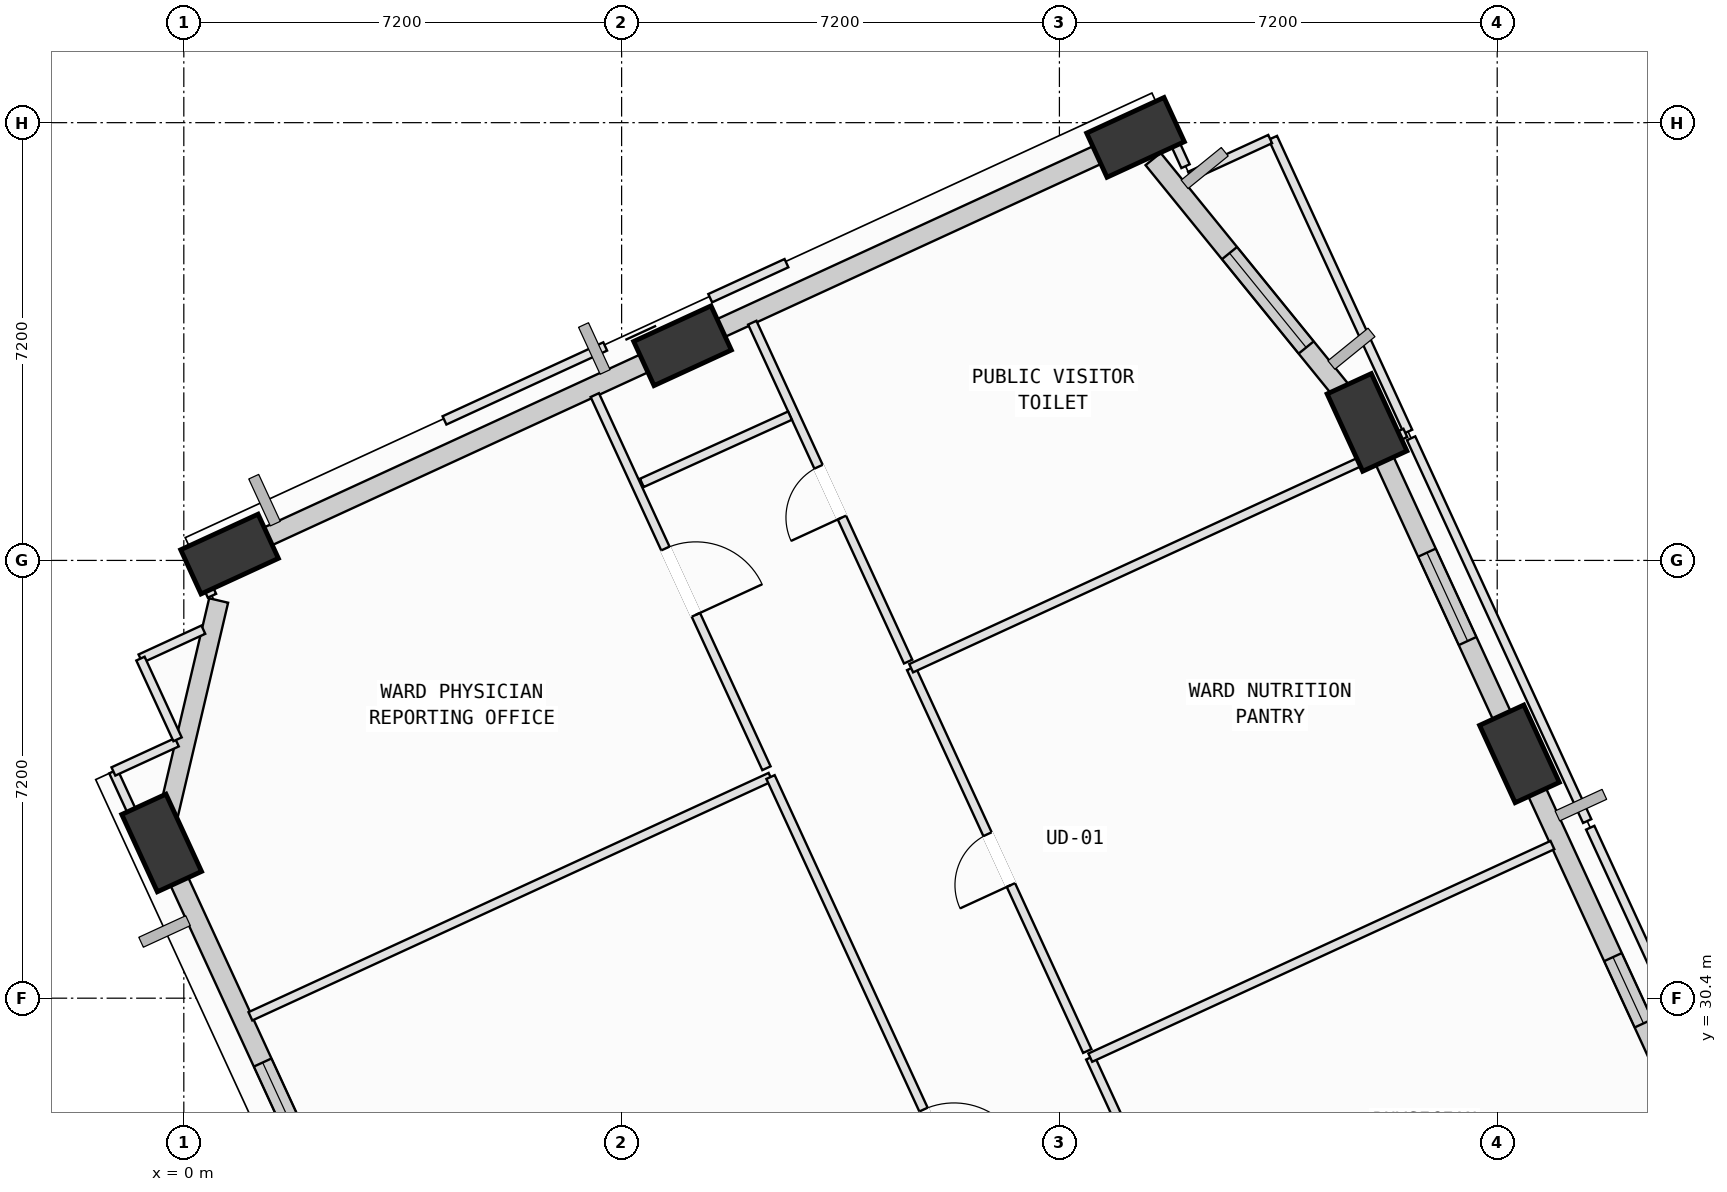
"""IFC4 building model, lengths in metres.
Left out: names, types, materials, properties, quantities, classifications, styles, units other than length and angle.
Written with IfcOpenShell. Run it as: python <this file> out.ifc"""

import sys

from ifc_helpers import new_model, si_unit, direction, frame, frame_2d, origin, origin_2d, place, context, subcontext, project, spatial, rectangle, extrude, element, fill, save


model = new_model("IFC4")
c1 = context("Model", 3, precision=1e-05, world=origin(), true_north=direction((0.0, 1.0)))
c2 = subcontext(c1, "Body", "Model", "MODEL_VIEW")
j1 = project(units=[si_unit("LENGTHUNIT", "METRE"), si_unit("PLANEANGLEUNIT", "RADIAN")], contexts=[c1])
p1 = place(None, origin())
s1 = spatial("IfcSite", under=j1, at=p1, CompositionType="ELEMENT")
p2 = place(p1, origin())
s2 = spatial("IfcBuilding", under=s1, at=p2, CompositionType="ELEMENT")
p3 = place(p2, frame((0.0, 0.0, 128.4)))
s3 = spatial("IfcBuildingStorey", under=s2, at=p3, CompositionType="ELEMENT", Elevation=128.4)
p4 = place(p3, frame((21.966, 34.419, 0.002), z_axis=(-0.039387790882, -0.048472590946, 0.998047598993), x_axis=(0.247513343788, 0.9672214419, 0.056743519237)))
e1 = element("IfcColumn", 1, at=p4, inside=s3, PredefinedType="COLUMN", context=c2, shape_type="SweptSolid", body=[
    extrude(rectangle(XDim=1.4, YDim=0.8, at=origin_2d()), origin(), (0.0, 0.0, 1.0), 4.004),
])
p5 = place(p3, frame((19.459, 39.87, 0.002), z_axis=(-0.061781069233, -0.058920270954, 0.996349085991), x_axis=(0.366661036491, 0.927115878049, 0.077561801087)))
e2 = element("IfcColumn", 2, at=p5, inside=s3, PredefinedType="COLUMN", context=c2, shape_type="SweptSolid", body=[
    extrude(rectangle(XDim=1.4, YDim=0.8, at=origin_2d()), origin(), (0.0, 0.0, 1.0), 4.011),
])
p6 = place(p3, frame((15.652, 44.558, 0.002), z_axis=(-0.080758451197, -0.074625666557, 0.993936156124), x_axis=(0.921615897626, -0.385373724027, 0.04594812371)))
e3 = element("IfcColumn", 3, at=p6, inside=s3, PredefinedType="COLUMN", context=c2, shape_type="SweptSolid", body=[
    extrude(rectangle(XDim=1.4, YDim=0.8, at=origin_2d()), origin(), (0.0, 0.0, 1.0), 4.021),
])
p7 = place(p3, frame((8.202, 41.131, 0.002), z_axis=(-0.066315906704, -0.105050700474, 0.992253269507), x_axis=(0.989572277027, -0.134357096422, 0.05191222573)))
e4 = element("IfcColumn", 4, at=p7, inside=s3, PredefinedType="COLUMN", context=c2, shape_type="SweptSolid", body=[
    extrude(rectangle(XDim=1.4, YDim=0.8, at=origin_2d()), origin(), (0.0, 0.0, 1.0), 4.028),
])
p8 = place(p3, frame((0.752, 37.704, 0.002), z_axis=(-0.051803682793, -0.135161067357, 0.989468475657), x_axis=(0.996307293589, 0.060936555127, 0.060485642854)))
e5 = element("IfcColumn", 5, at=p8, inside=s3, PredefinedType="COLUMN", context=c2, shape_type="SweptSolid", body=[
    extrude(rectangle(XDim=1.4, YDim=0.8, at=origin_2d()), origin(), (0.0, 0.0, 1.0), 4.039),
])
p9 = place(p3, frame((-0.365, 32.953, 0.002), z_axis=(-0.032286006217, -0.139603723512, 0.989680965859), x_axis=(-0.20452711643, 0.970166043723, 0.130178747314)))
e6 = element("IfcColumn", 6, at=p9, inside=s3, PredefinedType="COLUMN", context=c2, shape_type="SweptSolid", body=[
    extrude(rectangle(XDim=1.4, YDim=0.8, at=origin_2d()), origin(), (0.0, 0.0, 1.0), 4.038),
])
p10 = place(p3, frame((22.191, 33.929, 0.0), z_axis=(0.0, 0.0, 1.0), x_axis=(0.417833720383, -0.908523517643, 0.0)))
e7 = element("IfcWall", 7, at=p10, inside=s3, PredefinedType="SOLIDWALL", context=c2, shape_type="SweptSolid", body=[
    extrude(rectangle(XDim=6.223, YDim=0.32, at=frame_2d((3.111, 0.0))), origin(), (0.0, 0.0, 1.0), 3.165),
])
p11 = place(p10, frame((3.141, 0.0, 0.75)))
e8 = element("IfcOpeningElement", 8, at=p11, cuts=e7, PredefinedType="OPENING", context=c2, shape_type="SweptSolid", body=[
    extrude(rectangle(XDim=1.2, YDim=1.75, at=frame_2d((0.6, 0.875))), frame((0.0, 0.17, 0.0), z_axis=(0.0, -1.0, 0.0), x_axis=(1.0, 0.0, 0.0)), (0.0, 0.0, 1.0), 0.34),
])
p12 = place(p3, frame((19.678, 39.393, 0.0), z_axis=(0.0, 0.0, 1.0), x_axis=(0.417876863303, -0.908503674795, 0.0)))
e9 = element("IfcWall", 9, at=p12, inside=s3, PredefinedType="SOLIDWALL", context=c2, shape_type="SweptSolid", body=[
    extrude(rectangle(XDim=5.047, YDim=0.32, at=frame_2d((2.524, 0.0))), origin(), (0.0, 0.0, 1.0), 3.165),
])
p13 = place(p12, frame((1.833, 0.0, 0.75)))
e10 = element("IfcOpeningElement", 10, at=p13, cuts=e9, PredefinedType="OPENING", context=c2, shape_type="SweptSolid", body=[
    extrude(rectangle(XDim=1.6, YDim=1.95, at=frame_2d((0.8, 0.975))), frame((0.0, 0.17, 0.0), z_axis=(0.0, -1.0, 0.0), x_axis=(1.0, 0.0, 0.0)), (0.0, 0.0, 1.0), 0.34),
])
p14 = place(p3, frame((15.941, 44.202, 0.0), z_axis=(0.0, 0.0, 1.0), x_axis=(0.63040801919, -0.776263955972, 0.0)))
e11 = element("IfcWall", 11, at=p14, inside=s3, PredefinedType="SOLIDWALL", context=c2, shape_type="SweptSolid", body=[
    extrude(rectangle(XDim=5.129, YDim=0.32, at=frame_2d((2.564, 0.0))), origin(), (0.0, 0.0, 1.0), 3.165),
])
p15 = place(p14, frame((1.993, 0.0, 0.75)))
e12 = element("IfcOpeningElement", 12, at=p15, cuts=e11, PredefinedType="OPENING", context=c2, shape_type="SweptSolid", body=[
    extrude(rectangle(XDim=2.0, YDim=1.95, at=frame_2d((1.0, 0.975))), frame((0.0, 0.17, 0.0), z_axis=(0.0, -1.0, 0.0), x_axis=(1.0, 0.0, 0.0)), (0.0, 0.0, 1.0), 0.34),
])
p16 = place(p3, frame((8.445, 41.243, 0.0), z_axis=(0.0, 0.0, 1.0), x_axis=(0.908511987078, 0.417858791143, 0.0)))
e13 = element("IfcWall", 13, at=p16, inside=s3, PredefinedType="SOLIDWALL", context=c2, shape_type="SweptSolid", body=[
    extrude(rectangle(XDim=7.231, YDim=0.32, at=frame_2d((3.615, 0.0))), origin(), (0.0, 0.0, 1.0), 3.165),
])
p17 = place(p3, frame((0.973, 37.806, 0.0), z_axis=(0.0, 0.0, 1.0), x_axis=(0.908513910625, 0.417854608927, 0.0)))
e14 = element("IfcWall", 14, at=p17, inside=s3, PredefinedType="SOLIDWALL", context=c2, shape_type="SweptSolid", body=[
    extrude(rectangle(XDim=7.27, YDim=0.32, at=frame_2d((3.635, 0.0))), origin(), (0.0, 0.0, 1.0), 3.165),
])
p18 = place(p3, frame((-0.317, 33.155, 0.0), z_axis=(0.0, 0.0, 1.0), x_axis=(0.228790927923, 0.97347558331, 0.0)))
e15 = element("IfcWall", 15, at=p18, inside=s3, PredefinedType="SOLIDWALL", context=c2, shape_type="SweptSolid", body=[
    extrude(rectangle(XDim=3.89, YDim=0.32, at=frame_2d((1.945, 0.0))), origin(), (0.0, 0.0, 1.0), 3.165),
])
p19 = place(p3, frame((2.205, 27.368, 0.0), z_axis=(0.0, 0.0, 1.0), x_axis=(-0.417871628393, 0.908506082635, 0.0)))
e16 = element("IfcWall", 16, at=p19, inside=s3, PredefinedType="SOLIDWALL", context=c2, shape_type="SweptSolid", body=[
    extrude(rectangle(XDim=5.456, YDim=0.32, at=frame_2d((2.728, 0.0))), origin(), (0.0, 0.0, 1.0), 3.165),
])
p20 = place(p19, frame((0.573, 0.0, 0.75)))
e17 = element("IfcOpeningElement", 17, at=p20, cuts=e16, PredefinedType="OPENING", context=c2, shape_type="SweptSolid", body=[
    extrude(rectangle(XDim=1.6, YDim=1.95, at=frame_2d((0.8, 0.975))), frame((0.0, 0.17, 0.0), z_axis=(0.0, -1.0, 0.0), x_axis=(1.0, 0.0, 0.0)), (0.0, 0.0, 1.0), 0.34),
])
p21 = place(p3, frame((1.095, 30.102, 0.0), z_axis=(0.0, 0.0, 1.0), x_axis=(0.908480804965, 0.417926580884, 0.0)))
e18 = element("IfcWall", 18, at=p21, inside=s3, PredefinedType="PARTITIONING", context=c2, shape_type="SweptSolid", body=[
    extrude(rectangle(XDim=9.416, YDim=0.15, at=frame_2d((4.708, 0.0))), origin(), (0.0, 0.0, 1.0), 3.78),
])
p22 = place(p3, frame((9.649, 34.037, 0.0), z_axis=(0.0, 0.0, 1.0), x_axis=(0.417880345161, -0.908502073266, 0.0)))
e19 = element("IfcWall", 19, at=p22, inside=s3, PredefinedType="PARTITIONING", context=c2, shape_type="SweptSolid", body=[
    extrude(rectangle(XDim=13.24, YDim=0.15, at=frame_2d((6.62, 0.0))), origin(), (0.0, 0.0, 1.0), 2.965),
])
p23 = place(p22, frame((6.02, 0.0, 0.0)))
e20 = element("IfcOpeningElement", 20, at=p23, cuts=e19, PredefinedType="OPENING", context=c2, shape_type="SweptSolid", body=[
    extrude(rectangle(XDim=1.2, YDim=2.15, at=frame_2d((0.6, 1.075))), frame((0.0, 0.085, 0.0), z_axis=(0.0, -1.0, 0.0), x_axis=(1.0, 0.0, 0.0)), (0.0, 0.0, 1.0), 0.17),
])
p24 = place(p3, frame((-0.713, 35.985, 0.0), z_axis=(0.0, 0.0, 1.0), x_axis=(0.908417143936, 0.41806493826, 0.0)))
e21 = element("IfcWall", 21, at=p24, inside=s3, PredefinedType="PARTITIONING", context=c2, shape_type="SweptSolid", body=[
    extrude(rectangle(XDim=1.138, YDim=0.15, at=frame_2d((0.569, 0.0))), origin(), (0.0, 0.0, 1.0), 3.78),
])
p25 = place(p3, frame((0.463, 37.019, 0.0), z_axis=(0.0, 0.0, 1.0), x_axis=(-0.418481684179, 0.908225236385, 0.0)))
e22 = element("IfcWall", 22, at=p25, inside=s3, PredefinedType="PARTITIONING", context=c2, shape_type="SweptSolid", body=[
    extrude(rectangle(XDim=0.671, YDim=0.15, at=frame_2d((0.336, 0.0))), origin(), (0.0, 0.0, 1.0), 2.965),
])
p26 = place(p3, frame((0.182, 37.629, 0.0), z_axis=(0.0, 0.0, 1.0), x_axis=(0.908607354341, 0.417651380504, 0.0)))
e23 = element("IfcWall", 23, at=p26, inside=s3, PredefinedType="PARTITIONING", context=c2, shape_type="SweptSolid", body=[
    extrude(rectangle(XDim=0.793, YDim=0.15, at=frame_2d((0.396, 0.0))), origin(), (0.0, 0.0, 1.0), 3.78),
])
p27 = place(p3, frame((6.759, 40.319, 0.0), z_axis=(0.0, 0.0, 1.0), x_axis=(0.417891290431, -0.908497038731, 0.0)))
e24 = element("IfcWall", 24, at=p27, inside=s3, PredefinedType="PARTITIONING", context=c2, shape_type="SweptSolid", body=[
    extrude(rectangle(XDim=6.755, YDim=0.15, at=frame_2d((3.378, 0.0))), origin(), (0.0, 0.0, 1.0), 2.965),
])
p28 = place(p27, frame((2.778, 0.0, 0.0)))
e25 = element("IfcOpeningElement", 25, at=p28, cuts=e24, PredefinedType="OPENING", context=c2, shape_type="SweptSolid", body=[
    extrude(rectangle(XDim=1.2, YDim=2.15, at=frame_2d((0.6, 1.075))), frame((0.0, 0.085, 0.0), z_axis=(0.0, -1.0, 0.0), x_axis=(1.0, 0.0, 0.0)), (0.0, 0.0, 1.0), 0.17),
])
p29 = place(p3, frame((-0.284, 32.228, 0.0), z_axis=(0.0, 0.0, 1.0), x_axis=(-0.417755356028, 0.90855955364, 0.0)))
e26 = element("IfcWall", 26, at=p29, inside=s3, PredefinedType="PARTITIONING", context=c2, shape_type="SweptSolid", body=[
    extrude(rectangle(XDim=2.092, YDim=0.15, at=frame_2d((1.046, 0.0))), origin(), (0.0, 0.0, 1.0), 3.165),
])
p30 = place(p3, frame((-1.158, 34.129, 0.0), z_axis=(0.0, 0.0, 1.0), x_axis=(0.908567881383, 0.417737243873, 0.0)))
e27 = element("IfcWall", 27, at=p30, inside=s3, PredefinedType="PARTITIONING", context=c2, shape_type="SweptSolid", body=[
    extrude(rectangle(XDim=1.149, YDim=0.15, at=frame_2d((0.574, 0.0))), origin(), (0.0, 0.0, 1.0), 3.78),
])
p31 = place(p3, frame((-0.103, 34.658, 0.0), z_axis=(0.0, 0.0, 1.0), x_axis=(-0.417552394097, 0.908652848003, 0.0)))
e28 = element("IfcWall", 28, at=p31, inside=s3, PredefinedType="PARTITIONING", context=c2, shape_type="SweptSolid", body=[
    extrude(rectangle(XDim=1.46, YDim=0.15, at=frame_2d((0.73, 0.0))), origin(), (0.0, 0.0, 1.0), 3.78),
])
p32 = place(p3, frame((18.975, 20.58, 0.0), z_axis=(0.0, 0.0, 1.0), x_axis=(-0.417888630953, 0.908498262035, 0.0)))
e29 = element("IfcWall", 29, at=p32, inside=s3, PredefinedType="PARTITIONING", context=c2, shape_type="SweptSolid", body=[
    extrude(rectangle(XDim=9.733, YDim=0.15, at=frame_2d((4.866, 0.0))), origin(), (0.0, 0.0, 1.0), 3.78),
])
p33 = place(p32, frame((4.266, 0.0, 0.0)))
e30 = element("IfcOpeningElement", 30, at=p33, cuts=e29, PredefinedType="OPENING", context=c2, shape_type="SweptSolid", body=[
    extrude(rectangle(XDim=1.2, YDim=2.15, at=frame_2d((0.6, 1.075))), frame((0.0, 0.085, 0.0), z_axis=(0.0, -1.0, 0.0), x_axis=(1.0, 0.0, 0.0)), (0.0, 0.0, 1.0), 0.17),
])
p34 = place(p3, frame((14.908, 29.422, 0.0), z_axis=(0.0, 0.0, 1.0), x_axis=(0.908499316562, 0.417886338383, 0.0)))
e31 = element("IfcWall", 31, at=p34, inside=s3, PredefinedType="PARTITIONING", context=c2, shape_type="SweptSolid", body=[
    extrude(rectangle(XDim=8.365, YDim=0.15, at=frame_2d((4.183, 0.0))), origin(), (0.0, 0.0, 1.0), 3.78),
])
p35 = place(p3, frame((23.13, 33.204, 0.0), z_axis=(0.0, 0.0, 1.0), x_axis=(0.417943219407, -0.908473150595, 0.0)))
e32 = element("IfcWall", 32, at=p35, inside=s3, PredefinedType="PARTITIONING", context=c2, shape_type="SweptSolid", body=[
    extrude(rectangle(XDim=9.75, YDim=0.15, at=frame_2d((4.875, 0.0))), origin(), (0.0, 0.0, 1.0), 3.78),
])
p36 = place(p3, frame((14.858, 29.531, 0.0), z_axis=(0.0, 0.0, 1.0), x_axis=(-0.417891651322, 0.908496872727, 0.0)))
e33 = element("IfcWall", 33, at=p36, inside=s3, PredefinedType="PARTITIONING", context=c2, shape_type="SweptSolid", body=[
    extrude(rectangle(XDim=6.93, YDim=0.15, at=frame_2d((3.465, 0.0))), origin(), (0.0, 0.0, 1.0), 3.78),
])
p37 = place(p36, frame((3.005, 0.0, 0.0)))
e34 = element("IfcOpeningElement", 34, at=p37, cuts=e33, PredefinedType="OPENING", context=c2, shape_type="SweptSolid", body=[
    extrude(rectangle(XDim=0.92, YDim=2.1, at=frame_2d((0.46, 1.05))), frame((0.0, 0.085, 0.0), z_axis=(0.0, -1.0, 0.0), x_axis=(1.0, 0.0, 0.0)), (0.0, 0.0, 1.0), 0.17),
])
p38 = place(p3, frame((11.962, 35.827, 0.0), z_axis=(0.0, 0.0, 1.0), x_axis=(0.908488236671, 0.417910425606, 0.0)))
e35 = element("IfcWall", 35, at=p38, inside=s3, PredefinedType="PARTITIONING", context=c2, shape_type="SweptSolid", body=[
    extrude(rectangle(XDim=8.366, YDim=0.15, at=frame_2d((4.183, 0.0))), origin(), (0.0, 0.0, 1.0), 3.78),
])
p39 = place(p3, frame((20.184, 39.609, 0.0), z_axis=(0.0, 0.0, 1.0), x_axis=(0.417891651322, -0.908496872727, 0.0)))
e36 = element("IfcWall", 36, at=p39, inside=s3, PredefinedType="PARTITIONING", context=c2, shape_type="SweptSolid", body=[
    extrude(rectangle(XDim=6.93, YDim=0.15, at=frame_2d((3.465, 0.0))), origin(), (0.0, 0.0, 1.0), 3.78),
])
p40 = place(p3, frame((17.911, 44.551, 0.0), z_axis=(0.0, 0.0, 1.0), x_axis=(0.417899547771, -0.908493240466, 0.0)))
e37 = element("IfcWall", 37, at=p40, inside=s3, PredefinedType="PARTITIONING", context=c2, shape_type="SweptSolid", body=[
    extrude(rectangle(XDim=5.32, YDim=0.15, at=frame_2d((2.66, 0.0))), origin(), (0.0, 0.0, 1.0), 3.78),
])
p41 = place(p3, frame((20.089, 39.697, 0.0), z_axis=(0.0, 0.0, 1.0), x_axis=(-0.908869760295, -0.417080038867, 0.0)))
e38 = element("IfcWall", 38, at=p41, inside=s3, PredefinedType="PARTITIONING", context=c2, shape_type="SweptSolid", body=[
    extrude(rectangle(XDim=0.415, YDim=0.15, at=frame_2d((0.208, 0.0))), origin(), (0.0, 0.0, 1.0), 3.78),
])
p42 = place(p3, frame((11.912, 35.936, 0.0), z_axis=(0.0, 0.0, 1.0), x_axis=(-0.417765684328, 0.90855480462, 0.0)))
e39 = element("IfcWall", 39, at=p42, inside=s3, PredefinedType="PARTITIONING", context=c2, shape_type="SweptSolid", body=[
    extrude(rectangle(XDim=6.135, YDim=0.15, at=frame_2d((3.067, 0.0))), origin(), (0.0, 0.0, 1.0), 3.78),
])
p43 = place(p42, frame((2.607, 0.0, 0.0)))
e40 = element("IfcOpeningElement", 40, at=p43, cuts=e39, PredefinedType="OPENING", context=c2, shape_type="SweptSolid", body=[
    extrude(rectangle(XDim=0.92, YDim=2.1, at=frame_2d((0.46, 1.05))), frame((0.0, 0.085, 0.0), z_axis=(0.0, -1.0, 0.0), x_axis=(1.0, 0.0, 0.0)), (0.0, 0.0, 1.0), 0.17),
])
p44 = place(p3, frame((14.935, 44.437, 0.0), z_axis=(0.0, 0.0, 1.0), x_axis=(0.908506746568, 0.417870184915, 0.0)))
e41 = element("IfcWall", 41, at=p44, inside=s3, PredefinedType="PARTITIONING", context=c2, shape_type="SweptSolid", body=[
    extrude(rectangle(XDim=1.251, YDim=0.15, at=frame_2d((0.626, 0.0))), origin(), (0.0, 0.0, 1.0), 3.165),
])
p45 = place(p3, frame((16.093, 44.915, 0.0), z_axis=(0.0, 0.0, 1.0), x_axis=(0.416838598476, -0.908980518394, 0.0)))
e42 = element("IfcWall", 42, at=p45, inside=s3, PredefinedType="PARTITIONING", context=c2, shape_type="SweptSolid", body=[
    extrude(rectangle(XDim=0.914, YDim=0.15, at=frame_2d((0.457, 0.0))), origin(), (0.0, 0.0, 1.0), 3.78),
])
p46 = place(p3, frame((16.548, 43.924, 0.0), z_axis=(0.0, 0.0, 1.0), x_axis=(0.908559455179, 0.417755570166, 0.0)))
e43 = element("IfcWall", 43, at=p46, inside=s3, PredefinedType="PARTITIONING", context=c2, shape_type="SweptSolid", body=[
    extrude(rectangle(XDim=1.45, YDim=0.15, at=frame_2d((0.725, 0.0))), origin(), (0.0, 0.0, 1.0), 3.78),
])
p47 = place(p3, frame((9.969, 39.981, 0.0), z_axis=(0.0, 0.0, 1.0), x_axis=(-0.910553896639, -0.413390374, 0.0)))
e44 = element("IfcWall", 44, at=p47, inside=s3, PredefinedType="PARTITIONING", context=c2, shape_type="SweptSolid", body=[
    extrude(rectangle(XDim=2.675, YDim=0.15, at=frame_2d((1.338, 0.0))), origin(), (0.0, 0.0, 1.0), 3.78),
])
p48 = place(p3, frame((4.287, 39.903, 0.0), z_axis=(0.0, 0.0, 1.0), x_axis=(0.908474520638, 0.417940241365, 0.0)))
e45 = element("IfcWall", 45, at=p48, inside=s3, PredefinedType="PARTITIONING", context=c2, shape_type="SweptSolid", body=[
    extrude(rectangle(XDim=2.909, YDim=0.15, at=frame_2d((1.455, 0.0))), origin(), (0.0, 0.0, 1.0), 3.78),
])
p49 = place(p3, frame((8.657, 41.913, 0.0), z_axis=(0.0, 0.0, 1.0), x_axis=(0.908729447194, 0.417385663149, 0.0)))
e46 = element("IfcWall", 46, at=p49, inside=s3, PredefinedType="PARTITIONING", context=c2, shape_type="SweptSolid", body=[
    extrude(rectangle(XDim=1.38, YDim=0.15, at=frame_2d((0.69, 0.0))), origin(), (0.0, 0.0, 1.0), 3.78),
])
p50 = place(p11, origin())
e47 = element("IfcWindow", 47, at=p50, inside=s3, PartitioningType="SINGLE_PANEL", PredefinedType="WINDOW", context=c2, shape_type="SweptSolid", body=[
    extrude(rectangle(XDim=1.2, YDim=1.75, at=frame_2d((0.6, 0.875))), frame((0.0, 0.03, 0.0), z_axis=(0.0, -1.0, 0.0), x_axis=(1.0, 0.0, 0.0)), (0.0, 0.0, 1.0), 0.06),
])
fill(e8, e47)
p51 = place(p13, origin())
e48 = element("IfcWindow", 48, at=p51, inside=s3, PartitioningType="SINGLE_PANEL", PredefinedType="WINDOW", context=c2, shape_type="SweptSolid", body=[
    extrude(rectangle(XDim=1.6, YDim=1.95, at=frame_2d((0.8, 0.975))), frame((0.0, 0.03, 0.0), z_axis=(0.0, -1.0, 0.0), x_axis=(1.0, 0.0, 0.0)), (0.0, 0.0, 1.0), 0.06),
])
fill(e10, e48)
p52 = place(p15, origin())
e49 = element("IfcWindow", 49, at=p52, inside=s3, PartitioningType="SINGLE_PANEL", PredefinedType="WINDOW", context=c2, shape_type="SweptSolid", body=[
    extrude(rectangle(XDim=2.0, YDim=1.95, at=frame_2d((1.0, 0.975))), frame((0.0, 0.03, 0.0), z_axis=(0.0, -1.0, 0.0), x_axis=(1.0, 0.0, 0.0)), (0.0, 0.0, 1.0), 0.06),
])
fill(e12, e49)
p53 = place(p20, origin())
e50 = element("IfcWindow", 50, at=p53, inside=s3, PartitioningType="SINGLE_PANEL", PredefinedType="WINDOW", context=c2, shape_type="SweptSolid", body=[
    extrude(rectangle(XDim=1.6, YDim=1.95, at=frame_2d((0.8, 0.975))), frame((0.0, 0.03, 0.0), z_axis=(0.0, -1.0, 0.0), x_axis=(1.0, 0.0, 0.0)), (0.0, 0.0, 1.0), 0.06),
])
fill(e17, e50)
p54 = place(p23, origin())
e51 = element("IfcDoor", 51, at=p54, inside=s3, OperationType="SINGLE_SWING_RIGHT", PredefinedType="DOOR", context=c2, shape_type="SweptSolid", body=[
    extrude(rectangle(XDim=1.2, YDim=2.15, at=frame_2d((0.6, 1.075))), frame((0.0, 0.025, 0.0), z_axis=(0.0, -1.0, 0.0), x_axis=(1.0, 0.0, 0.0)), (0.0, 0.0, 1.0), 0.05),
])
fill(e20, e51)
p55 = place(p28, origin())
e52 = element("IfcDoor", 52, at=p55, inside=s3, OperationType="SINGLE_SWING_RIGHT", PredefinedType="DOOR", context=c2, shape_type="SweptSolid", body=[
    extrude(rectangle(XDim=1.2, YDim=2.15, at=frame_2d((0.6, 1.075))), frame((0.0, 0.025, 0.0), z_axis=(0.0, -1.0, 0.0), x_axis=(1.0, 0.0, 0.0)), (0.0, 0.0, 1.0), 0.05),
])
fill(e25, e52)
p56 = place(p37, origin())
e53 = element("IfcDoor", 53, at=p56, inside=s3, OperationType="SINGLE_SWING_LEFT", PredefinedType="DOOR", context=c2, shape_type="SweptSolid", body=[
    extrude(rectangle(XDim=0.92, YDim=2.1, at=frame_2d((0.46, 1.05))), frame((0.0, 0.025, 0.0), z_axis=(0.0, -1.0, 0.0), x_axis=(1.0, 0.0, 0.0)), (0.0, 0.0, 1.0), 0.05),
])
fill(e34, e53)
p57 = place(p43, origin())
e54 = element("IfcDoor", 54, at=p57, inside=s3, OperationType="SINGLE_SWING_LEFT", PredefinedType="DOOR", context=c2, shape_type="SweptSolid", body=[
    extrude(rectangle(XDim=0.92, YDim=2.1, at=frame_2d((0.46, 1.05))), frame((0.0, 0.025, 0.0), z_axis=(0.0, -1.0, 0.0), x_axis=(1.0, 0.0, 0.0)), (0.0, 0.0, 1.0), 0.05),
])
fill(e40, e54)
save(model, sys.argv[1])
